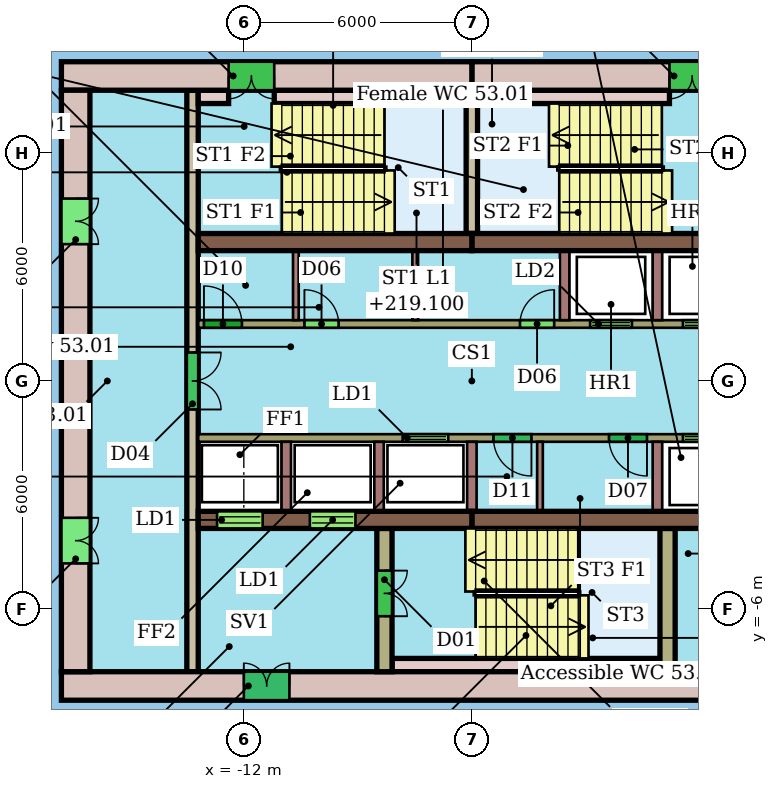
"""IFC4 building model, lengths in metres.
Left out: names, types, materials, properties, quantities, classifications, styles, units other than length and angle.
Written with IfcOpenShell. Run it as: python <this file> out.ifc"""

import sys

from ifc_helpers import new_model, si_unit, direction, frame, frame_2d, origin, place, context, subcontext, project, spatial, rectangle, extrude, element, fill, save


model = new_model("IFC4")
c1 = context("Model", 3, precision=1e-05, world=origin(), true_north=direction((0.0, 1.0)))
c2 = subcontext(c1, "Body", "Model", "MODEL_VIEW")
j1 = project(units=[si_unit("LENGTHUNIT", "METRE"), si_unit("PLANEANGLEUNIT", "RADIAN")], contexts=[c1])
p1 = place(None, origin())
s1 = spatial("IfcSite", under=j1, at=p1, CompositionType="ELEMENT")
p2 = place(p1, origin())
s2 = spatial("IfcBuilding", under=s1, at=p2, CompositionType="ELEMENT")
p3 = place(p2, frame((0.0, 0.0, 217.3)))
s3 = spatial("IfcBuildingStorey", under=s2, at=p3, CompositionType="ELEMENT", Elevation=217.3)
p4 = place(p3, frame((4.8, 8.025, 0.0), z_axis=(0.0, 0.0, 1.0), x_axis=(-1.0, 0.0, 0.0)))
e1 = element("IfcWall", 1, at=p4, inside=s3, PredefinedType="SHEAR", context=c2, shape_type="SweptSolid", body=[
    extrude(rectangle(XDim=10.8, YDim=0.75, at=frame_2d((5.4, 0.0))), origin(), (0.0, 0.0, 1.0), 3.3),
])
p5 = place(p4, frame((4.4, 0.0, 0.0)))
e2 = element("IfcOpeningElement", 2, at=p5, cuts=e1, PredefinedType="OPENING", context=c2, shape_type="SweptSolid", body=[
    extrude(rectangle(XDim=1.2, YDim=2.1, at=frame_2d((0.6, 1.05))), frame((0.0, 0.385, 0.0), z_axis=(0.0, -1.0, 0.0), x_axis=(1.0, 0.0, 0.0)), (0.0, 0.0, 1.0), 0.77),
])
p6 = place(p3, frame((-6.0, 8.025, 0.0), z_axis=(0.0, 0.0, 1.0), x_axis=(-1.0, 0.0, 0.0)))
e3 = element("IfcWall", 3, at=p6, inside=s3, PredefinedType="SHEAR", context=c2, shape_type="SweptSolid", body=[
    extrude(rectangle(XDim=10.8, YDim=0.75, at=frame_2d((5.4, 0.0))), origin(), (0.0, 0.0, 1.0), 3.3),
])
p7 = place(p6, frame((5.2, 0.0, 0.0)))
e4 = element("IfcOpeningElement", 4, at=p7, cuts=e3, PredefinedType="OPENING", context=c2, shape_type="SweptSolid", body=[
    extrude(rectangle(XDim=1.2, YDim=2.1, at=frame_2d((0.6, 1.05))), frame((0.0, 0.385, 0.0), z_axis=(0.0, -1.0, 0.0), x_axis=(1.0, 0.0, 0.0)), (0.0, 0.0, 1.0), 0.77),
])
p8 = place(p3, frame((-16.8, -8.025, 0.0), z_axis=(0.0, 0.0, 1.0), x_axis=(1.0, 0.0, 0.0)))
e5 = element("IfcWall", 5, at=p8, inside=s3, PredefinedType="SHEAR", context=c2, shape_type="SweptSolid", body=[
    extrude(rectangle(XDim=21.6, YDim=0.75, at=frame_2d((10.8, 0.0))), origin(), (0.0, 0.0, 1.0), 3.3),
])
p9 = place(p8, frame((4.8, 0.0, 0.0)))
e6 = element("IfcOpeningElement", 6, at=p9, cuts=e5, PredefinedType="OPENING", context=c2, shape_type="SweptSolid", body=[
    extrude(rectangle(XDim=1.2, YDim=2.1, at=frame_2d((0.6, 1.05))), frame((0.0, 0.385, 0.0), z_axis=(0.0, -1.0, 0.0), x_axis=(1.0, 0.0, 0.0)), (0.0, 0.0, 1.0), 0.77),
])
p10 = place(p3, frame((-16.425, 7.65, 0.0), z_axis=(0.0, 0.0, 1.0), x_axis=(0.0, -1.0, 0.0)))
e7 = element("IfcWall", 7, at=p10, inside=s3, PredefinedType="SHEAR", context=c2, shape_type="SweptSolid", body=[
    extrude(rectangle(XDim=15.3, YDim=0.75, at=frame_2d((7.65, 0.0))), origin(), (0.0, 0.0, 1.0), 3.3),
])
p11 = place(p10, frame((11.25, 0.0, 0.0)))
e8 = element("IfcOpeningElement", 8, at=p11, cuts=e7, PredefinedType="OPENING", context=c2, shape_type="SweptSolid", body=[
    extrude(rectangle(XDim=1.2, YDim=2.1, at=frame_2d((0.6, 1.05))), frame((0.0, 0.385, 0.0), z_axis=(0.0, -1.0, 0.0), x_axis=(1.0, 0.0, 0.0)), (0.0, 0.0, 1.0), 0.77),
])
p12 = place(p10, frame((2.85, 0.0, 0.0)))
e9 = element("IfcOpeningElement", 9, at=p12, cuts=e7, PredefinedType="OPENING", context=c2, shape_type="SweptSolid", body=[
    extrude(rectangle(XDim=1.2, YDim=2.1, at=frame_2d((0.6, 1.05))), frame((0.0, 0.385, 0.0), z_axis=(0.0, -1.0, 0.0), x_axis=(1.0, 0.0, 0.0)), (0.0, 0.0, 1.0), 0.77),
])
for number, where, z_axis, x_axis in (
    (10, (-13.2, 3.655, 0.0), (0.0, 0.0, 1.0), (1.0, 0.0, 0.0)),
    (11, (-6.0, 3.655, 0.0), (0.0, 0.0, 1.0), (1.0, 0.0, 0.0)),
):
    element("IfcWall", number, at=place(p3, frame(where, z_axis=z_axis, x_axis=x_axis)), inside=s3, PredefinedType="SHEAR", context=c2, shape_type="SweptSolid", body=[
        extrude(rectangle(XDim=7.2, YDim=0.45, at=frame_2d((3.6, 0.0))), origin(), (0.0, 0.0, 1.0), 3.3),
    ])
p13 = place(p3, frame((-13.2, -3.655, 0.0), z_axis=(0.0, 0.0, 1.0), x_axis=(1.0, 0.0, 0.0)))
e12 = element("IfcWall", 12, at=p13, inside=s3, PredefinedType="SHEAR", context=c2, shape_type="SweptSolid", body=[
    extrude(rectangle(XDim=7.2, YDim=0.45, at=frame_2d((3.6, 0.0))), origin(), (0.0, 0.0, 1.0), 3.3),
])
p14 = place(p13, frame((0.496, 0.0, 0.0)))
e13 = element("IfcOpeningElement", 13, at=p14, cuts=e12, PredefinedType="OPENING", context=c2, shape_type="SweptSolid", body=[
    extrude(rectangle(XDim=1.2, YDim=2.1, at=frame_2d((0.6, 1.05))), frame((0.0, 0.235, 0.0), z_axis=(0.0, -1.0, 0.0), x_axis=(1.0, 0.0, 0.0)), (0.0, 0.0, 1.0), 0.47),
])
p15 = place(p13, frame((2.938, 0.0, 0.0)))
e14 = element("IfcOpeningElement", 14, at=p15, cuts=e12, PredefinedType="OPENING", context=c2, shape_type="SweptSolid", body=[
    extrude(rectangle(XDim=1.2, YDim=2.1, at=frame_2d((0.6, 1.05))), frame((0.0, 0.235, 0.0), z_axis=(0.0, -1.0, 0.0), x_axis=(1.0, 0.0, 0.0)), (0.0, 0.0, 1.0), 0.47),
])
p16 = place(p3, frame((-6.0, -3.655, 0.0), z_axis=(0.0, 0.0, 1.0), x_axis=(1.0, 0.0, 0.0)))
e15 = element("IfcWall", 15, at=p16, inside=s3, PredefinedType="SHEAR", context=c2, shape_type="SweptSolid", body=[
    extrude(rectangle(XDim=7.2, YDim=0.45, at=frame_2d((3.6, 0.0))), origin(), (0.0, 0.0, 1.0), 3.3),
])
p17 = place(p3, frame((-13.35, 7.65, 0.0), z_axis=(0.0, 0.0, 1.0), x_axis=(0.0, -1.0, 0.0)))
e16 = element("IfcWall", 16, at=p17, inside=s3, PredefinedType="SHEAR", context=c2, shape_type="SweptSolid", body=[
    extrude(rectangle(XDim=15.3, YDim=0.3, at=frame_2d((7.65, 0.0))), origin(), (0.0, 0.0, 1.0), 3.3),
])
p18 = place(p17, frame((6.9, 0.0, 0.0)))
e17 = element("IfcOpeningElement", 17, at=p18, cuts=e16, PredefinedType="OPENING", context=c2, shape_type="SweptSolid", body=[
    extrude(rectangle(XDim=1.5, YDim=2.1, at=frame_2d((0.75, 1.05))), frame((0.0, 0.16, 0.0), z_axis=(0.0, -1.0, 0.0), x_axis=(1.0, 0.0, 0.0)), (0.0, 0.0, 1.0), 0.32),
])
p19 = place(p3, frame((-13.2, 1.5, 0.0), z_axis=(0.0, 0.0, 1.0), x_axis=(1.0, 0.0, 0.0)))
e18 = element("IfcWall", 18, at=p19, inside=s3, PredefinedType="SHEAR", context=c2, shape_type="SweptSolid", body=[
    extrude(rectangle(XDim=14.4, YDim=0.2, at=frame_2d((7.2, 0.0))), origin(), (0.0, 0.0, 1.0), 3.3),
])
p20 = place(p19, frame((10.312, 0.0, 0.0)))
e19 = element("IfcOpeningElement", 19, at=p20, cuts=e18, PredefinedType="OPENING", context=c2, shape_type="SweptSolid", body=[
    extrude(rectangle(XDim=1.1, YDim=2.1, at=frame_2d((0.55, 1.05))), frame((0.0, 0.11, 0.0), z_axis=(0.0, -1.0, 0.0), x_axis=(1.0, 0.0, 0.0)), (0.0, 0.0, 1.0), 0.22),
])
p21 = place(p19, frame((12.754, 0.0, 0.0)))
e20 = element("IfcOpeningElement", 20, at=p21, cuts=e18, PredefinedType="OPENING", context=c2, shape_type="SweptSolid", body=[
    extrude(rectangle(XDim=1.1, YDim=2.1, at=frame_2d((0.55, 1.05))), frame((0.0, 0.11, 0.0), z_axis=(0.0, -1.0, 0.0), x_axis=(1.0, 0.0, 0.0)), (0.0, 0.0, 1.0), 0.22),
])
p22 = place(p19, frame((0.15, 0.0, 0.0)))
e21 = element("IfcOpeningElement", 21, at=p22, cuts=e18, PredefinedType="OPENING", context=c2, shape_type="SweptSolid", body=[
    extrude(rectangle(XDim=1.0, YDim=2.1, at=frame_2d((0.5, 1.05))), frame((0.0, 0.11, 0.0), z_axis=(0.0, -1.0, 0.0), x_axis=(1.0, 0.0, 0.0)), (0.0, 0.0, 1.0), 0.22),
])
p23 = place(p19, frame((2.794, 0.0, 0.0)))
e22 = element("IfcOpeningElement", 22, at=p23, cuts=e18, PredefinedType="OPENING", context=c2, shape_type="SweptSolid", body=[
    extrude(rectangle(XDim=0.9, YDim=2.1, at=frame_2d((0.45, 1.05))), frame((0.0, 0.11, 0.0), z_axis=(0.0, -1.0, 0.0), x_axis=(1.0, 0.0, 0.0)), (0.0, 0.0, 1.0), 0.22),
])
p24 = place(p19, frame((8.467, 0.0, 0.0)))
e23 = element("IfcOpeningElement", 23, at=p24, cuts=e18, PredefinedType="OPENING", context=c2, shape_type="SweptSolid", body=[
    extrude(rectangle(XDim=0.9, YDim=2.1, at=frame_2d((0.45, 1.05))), frame((0.0, 0.11, 0.0), z_axis=(0.0, -1.0, 0.0), x_axis=(1.0, 0.0, 0.0)), (0.0, 0.0, 1.0), 0.22),
])
p25 = place(p3, frame((1.2, -1.5, 0.0), z_axis=(0.0, 0.0, 1.0), x_axis=(-1.0, 0.0, 0.0)))
e24 = element("IfcWall", 24, at=p25, inside=s3, PredefinedType="SHEAR", context=c2, shape_type="SweptSolid", body=[
    extrude(rectangle(XDim=14.4, YDim=0.2, at=frame_2d((7.2, 0.0))), origin(), (0.0, 0.0, 1.0), 3.3),
])
p26 = place(p25, frame((7.821, 0.0, 0.0)))
e25 = element("IfcOpeningElement", 25, at=p26, cuts=e24, PredefinedType="OPENING", context=c2, shape_type="SweptSolid", body=[
    extrude(rectangle(XDim=1.2, YDim=2.1, at=frame_2d((0.6, 1.05))), frame((0.0, 0.11, 0.0), z_axis=(0.0, -1.0, 0.0), x_axis=(1.0, 0.0, 0.0)), (0.0, 0.0, 1.0), 0.22),
])
p27 = place(p25, frame((0.546, 0.0, 0.0)))
e26 = element("IfcOpeningElement", 26, at=p27, cuts=e24, PredefinedType="OPENING", context=c2, shape_type="SweptSolid", body=[
    extrude(rectangle(XDim=1.1, YDim=2.1, at=frame_2d((0.55, 1.05))), frame((0.0, 0.11, 0.0), z_axis=(0.0, -1.0, 0.0), x_axis=(1.0, 0.0, 0.0)), (0.0, 0.0, 1.0), 0.22),
])
p28 = place(p25, frame((5.632, 0.0, 0.0)))
e27 = element("IfcOpeningElement", 27, at=p28, cuts=e24, PredefinedType="OPENING", context=c2, shape_type="SweptSolid", body=[
    extrude(rectangle(XDim=1.0, YDim=2.1, at=frame_2d((0.5, 1.05))), frame((0.0, 0.11, 0.0), z_axis=(0.0, -1.0, 0.0), x_axis=(1.0, 0.0, 0.0)), (0.0, 0.0, 1.0), 0.22),
])
p29 = place(p25, frame((2.592, 0.0, 0.0)))
e28 = element("IfcOpeningElement", 28, at=p29, cuts=e24, PredefinedType="OPENING", context=c2, shape_type="SweptSolid", body=[
    extrude(rectangle(XDim=1.0, YDim=2.1, at=frame_2d((0.5, 1.05))), frame((0.0, 0.11, 0.0), z_axis=(0.0, -1.0, 0.0), x_axis=(1.0, 0.0, 0.0)), (0.0, 0.0, 1.0), 0.22),
])
p30 = place(p3, frame((-8.3, -3.88, 0.0), z_axis=(0.0, 0.0, 1.0), x_axis=(0.0, -1.0, 0.0)))
e29 = element("IfcWall", 29, at=p30, inside=s3, PredefinedType="SHEAR", context=c2, shape_type="SweptSolid", body=[
    extrude(rectangle(XDim=3.77, YDim=0.4, at=frame_2d((1.885, 0.0))), origin(), (0.0, 0.0, 1.0), 3.3),
])
p31 = place(p30, frame((1.11, 0.0, 0.0)))
e30 = element("IfcOpeningElement", 30, at=p31, cuts=e29, PredefinedType="OPENING", context=c2, shape_type="SweptSolid", body=[
    extrude(rectangle(XDim=1.2, YDim=2.1, at=frame_2d((0.6, 1.05))), frame((0.0, 0.21, 0.0), z_axis=(0.0, -1.0, 0.0), x_axis=(1.0, 0.0, 0.0)), (0.0, 0.0, 1.0), 0.42),
])
p32 = place(p3, frame((-0.85, -3.88, 0.0), z_axis=(0.0, 0.0, 1.0), x_axis=(0.0, -1.0, 0.0)))
e31 = element("IfcWall", 31, at=p32, inside=s3, PredefinedType="SHEAR", context=c2, shape_type="SweptSolid", body=[
    extrude(rectangle(XDim=3.77, YDim=0.4, at=frame_2d((1.885, 0.0))), origin(), (0.0, 0.0, 1.0), 3.3),
])
p33 = place(p3, frame((-6.0, 3.88, 0.0), z_axis=(0.0, 0.0, 1.0), x_axis=(0.0, 1.0, 0.0)))
e32 = element("IfcWall", 32, at=p33, inside=s3, PredefinedType="SHEAR", context=c2, shape_type="SweptSolid", body=[
    extrude(rectangle(XDim=3.77, YDim=0.3, at=frame_2d((1.885, 0.0))), origin(), (0.0, 0.0, 1.0), 3.3),
])
p34 = place(p3, frame((-13.2, 7.475, 0.0), z_axis=(0.0, 0.0, 1.0), x_axis=(1.0, 0.0, 0.0)))
e33 = element("IfcWall", 33, at=p34, inside=s3, PredefinedType="SHEAR", context=c2, shape_type="SweptSolid", body=[
    extrude(rectangle(XDim=0.8, YDim=0.35, at=frame_2d((0.4, 0.0))), origin(), (0.0, 0.0, 1.0), 3.3),
])
for number, where, z_axis, x_axis in (
    (34, (-11.2, 7.475, 0.0), (0.0, 0.0, 1.0), (1.0, 0.0, 0.0)),
    (35, (-5.85, 7.475, 0.0), (0.0, 0.0, 1.0), (1.0, 0.0, 0.0)),
):
    element("IfcWall", number, at=place(p3, frame(where, z_axis=z_axis, x_axis=x_axis)), inside=s3, PredefinedType="SHEAR", context=c2, shape_type="SweptSolid", body=[
        extrude(rectangle(XDim=5.05, YDim=0.35, at=frame_2d((2.525, 0.0))), origin(), (0.0, 0.0, 1.0), 3.3),
    ])
p35 = place(p3, frame((-8.1, -7.475, 0.0), z_axis=(0.0, 0.0, 1.0), x_axis=(1.0, 0.0, 0.0)))
e36 = element("IfcWall", 36, at=p35, inside=s3, PredefinedType="SHEAR", context=c2, shape_type="SweptSolid", body=[
    extrude(rectangle(XDim=7.05, YDim=0.35, at=frame_2d((3.525, 0.0))), origin(), (0.0, 0.0, 1.0), 3.3),
])
for number, where, z_axis, x_axis in (
    (37, (-3.558, 1.6, 0.0), (0.0, 0.0, 1.0), (0.0, 1.0, 0.0)),
    (38, (-1.117, 1.6, 0.0), (0.0, 0.0, 1.0), (0.0, 1.0, 0.0)),
):
    element("IfcWall", number, at=place(p3, frame(where, z_axis=z_axis, x_axis=x_axis)), inside=s3, PredefinedType="SHEAR", context=c2, shape_type="SweptSolid", body=[
        extrude(rectangle(XDim=1.83, YDim=0.25, at=frame_2d((0.915, 0.0))), origin(), (0.0, 0.0, 1.0), 3.3),
    ])
for number, where, z_axis, x_axis in (
    (39, (-10.631, 1.6, 0.0), (0.0, 0.0, 1.0), (0.0, 1.0, 0.0)),
    (40, (-7.49, 1.6, 0.0), (0.0, 0.0, 1.0), (0.0, 1.0, 0.0)),
):
    element("IfcWall", number, at=place(p3, frame(where, z_axis=z_axis, x_axis=x_axis)), inside=s3, PredefinedType="PARTITIONING", context=c2, shape_type="SweptSolid", body=[
        extrude(rectangle(XDim=1.83, YDim=0.15, at=frame_2d((0.915, 0.0))), origin(), (0.0, 0.0, 1.0), 3.3),
    ])
for number, where, z_axis, x_axis in (
    (41, (-10.883, -1.6, 0.0), (0.0, 0.0, 1.0), (0.0, -1.0, 0.0)),
    (42, (-8.442, -1.6, 0.0), (0.0, 0.0, 1.0), (0.0, -1.0, 0.0)),
    (43, (-6.0, -1.6, 0.0), (0.0, 0.0, 1.0), (0.0, -1.0, 0.0)),
    (44, (-1.117, -1.6, 0.0), (0.0, 0.0, 1.0), (0.0, -1.0, 0.0)),
):
    element("IfcWall", number, at=place(p3, frame(where, z_axis=z_axis, x_axis=x_axis)), inside=s3, PredefinedType="SHEAR", context=c2, shape_type="SweptSolid", body=[
        extrude(rectangle(XDim=1.83, YDim=0.25, at=frame_2d((0.915, 0.0))), origin(), (0.0, 0.0, 1.0), 3.3),
    ])
p36 = place(p3, frame((-4.207, -1.6, 0.0), z_axis=(0.0, 0.0, 1.0), x_axis=(0.0, -1.0, 0.0)))
e45 = element("IfcWall", 45, at=p36, inside=s3, PredefinedType="PARTITIONING", context=c2, shape_type="SweptSolid", body=[
    extrude(rectangle(XDim=1.83, YDim=0.15, at=frame_2d((0.915, 0.0))), origin(), (0.0, 0.0, 1.0), 3.3),
])
p37 = place(p5, origin())
e46 = element("IfcDoor", 46, at=p37, inside=s3, OperationType="DOUBLE_DOOR_SINGLE_SWING", PredefinedType="NOTDEFINED", context=c2, shape_type="SweptSolid", body=[
    extrude(rectangle(XDim=1.2, YDim=2.1, at=frame_2d((0.6, 1.05))), frame((0.0, 0.025, 0.0), z_axis=(0.0, -1.0, 0.0), x_axis=(1.0, 0.0, 0.0)), (0.0, 0.0, 1.0), 0.05),
])
fill(e2, e46)
p38 = place(p7, origin())
e47 = element("IfcDoor", 47, at=p38, inside=s3, OperationType="DOUBLE_DOOR_SINGLE_SWING", PredefinedType="NOTDEFINED", context=c2, shape_type="SweptSolid", body=[
    extrude(rectangle(XDim=1.2, YDim=2.1, at=frame_2d((0.6, 1.05))), frame((0.0, 0.025, 0.0), z_axis=(0.0, -1.0, 0.0), x_axis=(1.0, 0.0, 0.0)), (0.0, 0.0, 1.0), 0.05),
])
fill(e4, e47)
p39 = place(p9, origin())
e48 = element("IfcDoor", 48, at=p39, inside=s3, OperationType="DOUBLE_DOOR_SINGLE_SWING", PredefinedType="NOTDEFINED", context=c2, shape_type="SweptSolid", body=[
    extrude(rectangle(XDim=1.2, YDim=2.1, at=frame_2d((0.6, 1.05))), frame((0.0, 0.025, 0.0), z_axis=(0.0, -1.0, 0.0), x_axis=(1.0, 0.0, 0.0)), (0.0, 0.0, 1.0), 0.05),
])
fill(e6, e48)
p40 = place(p11, origin())
e49 = element("IfcDoor", 49, at=p40, inside=s3, OperationType="DOUBLE_DOOR_SINGLE_SWING", PredefinedType="NOTDEFINED", context=c2, shape_type="SweptSolid", body=[
    extrude(rectangle(XDim=1.2, YDim=2.1, at=frame_2d((0.6, 1.05))), frame((0.0, 0.025, 0.0), z_axis=(0.0, -1.0, 0.0), x_axis=(1.0, 0.0, 0.0)), (0.0, 0.0, 1.0), 0.05),
])
fill(e8, e49)
p41 = place(p12, origin())
e50 = element("IfcDoor", 50, at=p41, inside=s3, OperationType="DOUBLE_DOOR_SINGLE_SWING", PredefinedType="NOTDEFINED", context=c2, shape_type="SweptSolid", body=[
    extrude(rectangle(XDim=1.2, YDim=2.1, at=frame_2d((0.6, 1.05))), frame((0.0, 0.025, 0.0), z_axis=(0.0, -1.0, 0.0), x_axis=(1.0, 0.0, 0.0)), (0.0, 0.0, 1.0), 0.05),
])
fill(e9, e50)
p42 = place(p14, origin())
e51 = element("IfcDoor", 51, at=p42, inside=s3, OperationType="DOUBLE_DOOR_SLIDING", PredefinedType="NOTDEFINED", context=c2, shape_type="SweptSolid", body=[
    extrude(rectangle(XDim=1.2, YDim=2.1, at=frame_2d((0.6, 1.05))), frame((0.0, 0.025, 0.0), z_axis=(0.0, -1.0, 0.0), x_axis=(1.0, 0.0, 0.0)), (0.0, 0.0, 1.0), 0.05),
])
fill(e13, e51)
p43 = place(p15, origin())
e52 = element("IfcDoor", 52, at=p43, inside=s3, OperationType="DOUBLE_DOOR_SLIDING", PredefinedType="NOTDEFINED", context=c2, shape_type="SweptSolid", body=[
    extrude(rectangle(XDim=1.2, YDim=2.1, at=frame_2d((0.6, 1.05))), frame((0.0, 0.025, 0.0), z_axis=(0.0, -1.0, 0.0), x_axis=(1.0, 0.0, 0.0)), (0.0, 0.0, 1.0), 0.05),
])
fill(e14, e52)
p44 = place(p18, origin())
e53 = element("IfcDoor", 53, at=p44, inside=s3, OperationType="DOUBLE_DOOR_SINGLE_SWING", PredefinedType="NOTDEFINED", context=c2, shape_type="SweptSolid", body=[
    extrude(rectangle(XDim=1.5, YDim=2.1, at=frame_2d((0.75, 1.05))), frame((0.0, 0.025, 0.0), z_axis=(0.0, -1.0, 0.0), x_axis=(1.0, 0.0, 0.0)), (0.0, 0.0, 1.0), 0.05),
])
fill(e17, e53)
p45 = place(p20, origin())
e54 = element("IfcDoor", 54, at=p45, inside=s3, OperationType="DOUBLE_DOOR_SLIDING", PredefinedType="NOTDEFINED", context=c2, shape_type="SweptSolid", body=[
    extrude(rectangle(XDim=1.1, YDim=2.1, at=frame_2d((0.55, 1.05))), frame((0.0, 0.025, 0.0), z_axis=(0.0, -1.0, 0.0), x_axis=(1.0, 0.0, 0.0)), (0.0, 0.0, 1.0), 0.05),
])
fill(e19, e54)
p46 = place(p21, origin())
e55 = element("IfcDoor", 55, at=p46, inside=s3, OperationType="DOUBLE_DOOR_SLIDING", PredefinedType="NOTDEFINED", context=c2, shape_type="SweptSolid", body=[
    extrude(rectangle(XDim=1.1, YDim=2.1, at=frame_2d((0.55, 1.05))), frame((0.0, 0.025, 0.0), z_axis=(0.0, -1.0, 0.0), x_axis=(1.0, 0.0, 0.0)), (0.0, 0.0, 1.0), 0.05),
])
fill(e20, e55)
p47 = place(p22, origin())
e56 = element("IfcDoor", 56, at=p47, inside=s3, OperationType="SINGLE_SWING_LEFT", PredefinedType="NOTDEFINED", context=c2, shape_type="SweptSolid", body=[
    extrude(rectangle(XDim=1.0, YDim=2.1, at=frame_2d((0.5, 1.05))), frame((0.0, 0.025, 0.0), z_axis=(0.0, -1.0, 0.0), x_axis=(1.0, 0.0, 0.0)), (0.0, 0.0, 1.0), 0.05),
])
fill(e21, e56)
p48 = place(p23, origin())
e57 = element("IfcDoor", 57, at=p48, inside=s3, OperationType="SINGLE_SWING_LEFT", PredefinedType="NOTDEFINED", context=c2, shape_type="SweptSolid", body=[
    extrude(rectangle(XDim=0.9, YDim=2.1, at=frame_2d((0.45, 1.05))), frame((0.0, 0.025, 0.0), z_axis=(0.0, -1.0, 0.0), x_axis=(1.0, 0.0, 0.0)), (0.0, 0.0, 1.0), 0.05),
])
fill(e22, e57)
p49 = place(p24, origin())
e58 = element("IfcDoor", 58, at=p49, inside=s3, OperationType="SINGLE_SWING_RIGHT", PredefinedType="NOTDEFINED", context=c2, shape_type="SweptSolid", body=[
    extrude(rectangle(XDim=0.9, YDim=2.1, at=frame_2d((0.45, 1.05))), frame((0.0, 0.025, 0.0), z_axis=(0.0, -1.0, 0.0), x_axis=(1.0, 0.0, 0.0)), (0.0, 0.0, 1.0), 0.05),
])
fill(e23, e58)
p50 = place(p26, origin())
e59 = element("IfcDoor", 59, at=p50, inside=s3, OperationType="DOUBLE_DOOR_SLIDING", PredefinedType="NOTDEFINED", context=c2, shape_type="SweptSolid", body=[
    extrude(rectangle(XDim=1.2, YDim=2.1, at=frame_2d((0.6, 1.05))), frame((0.0, 0.025, 0.0), z_axis=(0.0, -1.0, 0.0), x_axis=(1.0, 0.0, 0.0)), (0.0, 0.0, 1.0), 0.05),
])
fill(e25, e59)
p51 = place(p27, origin())
e60 = element("IfcDoor", 60, at=p51, inside=s3, OperationType="DOUBLE_DOOR_SLIDING", PredefinedType="NOTDEFINED", context=c2, shape_type="SweptSolid", body=[
    extrude(rectangle(XDim=1.1, YDim=2.1, at=frame_2d((0.55, 1.05))), frame((0.0, 0.025, 0.0), z_axis=(0.0, -1.0, 0.0), x_axis=(1.0, 0.0, 0.0)), (0.0, 0.0, 1.0), 0.05),
])
fill(e26, e60)
p52 = place(p28, origin())
e61 = element("IfcDoor", 61, at=p52, inside=s3, OperationType="SINGLE_SWING_LEFT", PredefinedType="NOTDEFINED", context=c2, shape_type="SweptSolid", body=[
    extrude(rectangle(XDim=1.0, YDim=2.1, at=frame_2d((0.5, 1.05))), frame((0.0, 0.025, 0.0), z_axis=(0.0, -1.0, 0.0), x_axis=(1.0, 0.0, 0.0)), (0.0, 0.0, 1.0), 0.05),
])
fill(e27, e61)
p53 = place(p29, origin())
e62 = element("IfcDoor", 62, at=p53, inside=s3, OperationType="SINGLE_SWING_LEFT", PredefinedType="NOTDEFINED", context=c2, shape_type="SweptSolid", body=[
    extrude(rectangle(XDim=1.0, YDim=2.1, at=frame_2d((0.5, 1.05))), frame((0.0, 0.025, 0.0), z_axis=(0.0, -1.0, 0.0), x_axis=(1.0, 0.0, 0.0)), (0.0, 0.0, 1.0), 0.05),
])
fill(e28, e62)
p54 = place(p31, origin())
e63 = element("IfcDoor", 63, at=p54, inside=s3, OperationType="DOUBLE_DOOR_SINGLE_SWING", PredefinedType="NOTDEFINED", context=c2, shape_type="SweptSolid", body=[
    extrude(rectangle(XDim=1.2, YDim=2.1, at=frame_2d((0.6, 1.05))), frame((0.0, 0.025, 0.0), z_axis=(0.0, -1.0, 0.0), x_axis=(1.0, 0.0, 0.0)), (0.0, 0.0, 1.0), 0.05),
])
fill(e30, e63)
save(model, sys.argv[1])
